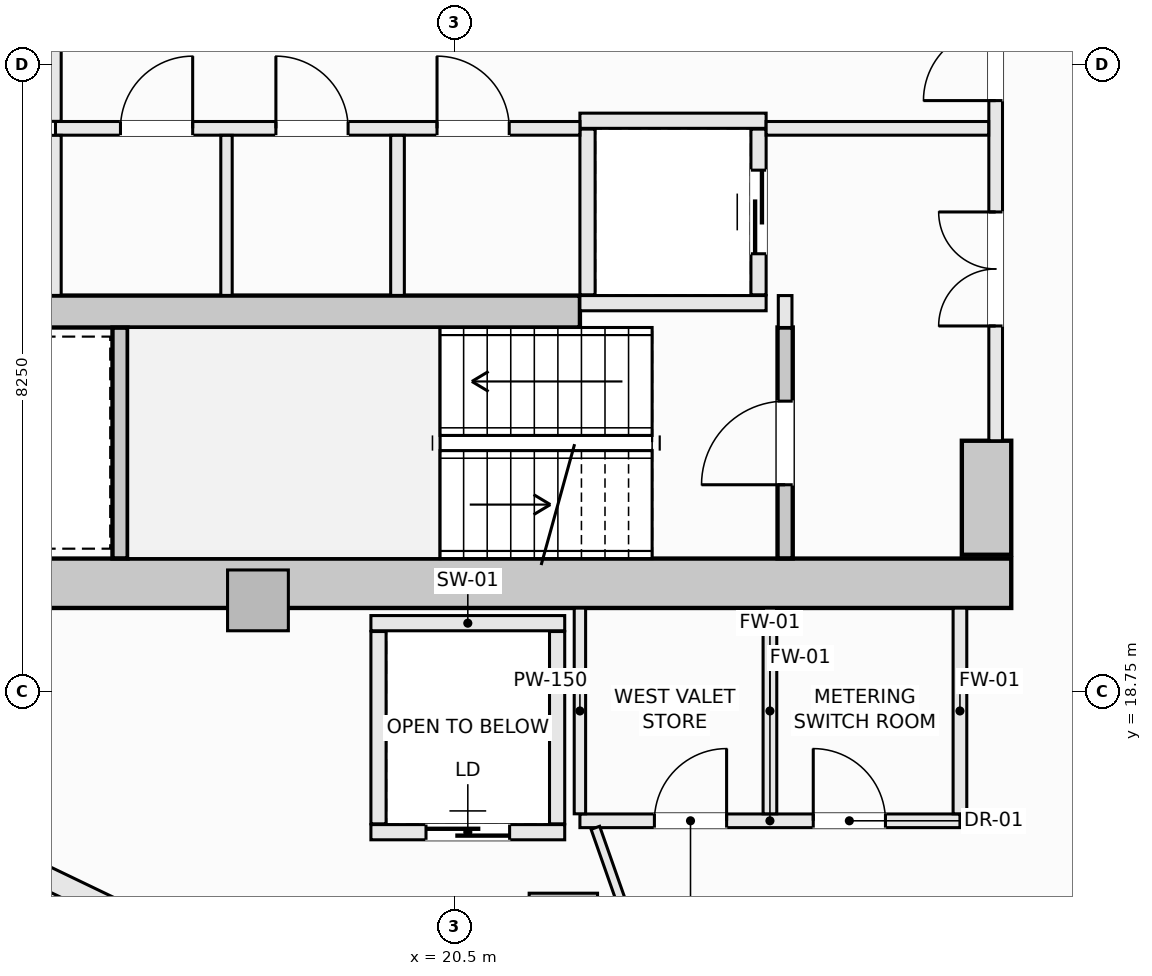
"""IFC4 building model, lengths in metres.
Left out: names, types, materials, properties, quantities, classifications, styles, units other than length and angle.
Written with IfcOpenShell. Run it as: python <this file> out.ifc"""

import sys

from ifc_helpers import new_model, si_unit, direction, frame, frame_2d, origin, origin_2d, place, context, subcontext, project, spatial, rectangle, extrude, element, fill, save


model = new_model("IFC4")
c1 = context("Model", 3, precision=1e-05, world=origin(), true_north=direction((0.0, 1.0)))
c2 = subcontext(c1, "Body", "Model", "MODEL_VIEW")
j1 = project(units=[si_unit("LENGTHUNIT", "METRE"), si_unit("PLANEANGLEUNIT", "RADIAN")], contexts=[c1])
p1 = place(None, origin())
s1 = spatial("IfcSite", under=j1, at=p1, CompositionType="ELEMENT")
p2 = place(p1, origin())
s2 = spatial("IfcBuilding", under=s1, at=p2, CompositionType="ELEMENT")
p3 = place(p2, frame((0.0, 0.0, 173.3)))
s3 = spatial("IfcBuildingStorey", under=s2, at=p3, CompositionType="ELEMENT", Elevation=173.3)
p4 = place(p3, frame((14.175, 20.175, -0.27), z_axis=(0.0, 0.0, 1.0), x_axis=(1.0, 0.0, 0.0)))
e1 = element("IfcWall", 1, at=p4, inside=s3, PredefinedType="SHEAR", context=c2, shape_type="SweptSolid", body=[
    extrude(rectangle(XDim=13.65, YDim=0.65, at=frame_2d((6.825, 0.0))), origin(), (0.0, 0.0, 1.0), 3.4),
])
p5 = place(p3, frame((27.5, 20.55, -0.27), z_axis=(0.0, 0.0, 1.0), x_axis=(0.0, 1.0, 0.0)))
e2 = element("IfcWall", 2, at=p5, inside=s3, PredefinedType="SHEAR", context=c2, shape_type="SweptSolid", body=[
    extrude(rectangle(XDim=1.5, YDim=0.65, at=frame_2d((0.75, 0.0))), origin(), (0.0, 0.0, 1.0), 3.4),
])
p6 = place(p3, frame((14.85, 23.75, -0.27), z_axis=(0.0, 0.0, 1.0), x_axis=(1.0, 0.0, 0.0)))
e3 = element("IfcWall", 3, at=p6, inside=s3, PredefinedType="SHEAR", context=c2, shape_type="SweptSolid", body=[
    extrude(rectangle(XDim=7.3, YDim=0.42, at=frame_2d((3.65, 0.0))), origin(), (0.0, 0.0, 1.0), 3.4),
])
p7 = place(p3, frame((21.932, 15.648, -0.27), z_axis=(0.0, 0.0, 1.0), x_axis=(1.0, 0.0, 0.0)))
e4 = element("IfcColumn", 4, at=p7, inside=s3, PredefinedType="COLUMN", context=c2, shape_type="SweptSolid", body=[
    extrude(rectangle(XDim=0.9, YDim=0.9, at=origin_2d()), origin(), (0.0, 0.0, 1.0), 3.4),
])
p8 = place(p3, frame((17.914, 19.95, -0.27), z_axis=(0.0, 0.0, 1.0), x_axis=(1.0, 0.0, 0.0)))
e5 = element("IfcColumn", 5, at=p8, inside=s3, PredefinedType="PILASTER", context=c2, shape_type="SweptSolid", body=[
    extrude(rectangle(XDim=0.8, YDim=0.8, at=origin_2d()), origin(), (0.0, 0.0, 1.0), 3.4),
])
p9 = place(p3, frame((11.127, 18.225, 0.0), z_axis=(0.0, 0.0, 1.0), x_axis=(0.901353070301, -0.433085029363, 0.0)))
e6 = element("IfcWall", 6, at=p9, inside=s3, PredefinedType="SOLIDWALL", context=c2, shape_type="SweptSolid", body=[
    extrude(rectangle(XDim=5.336, YDim=0.3, at=frame_2d((2.668, 0.0))), origin(), (0.0, 0.0, 1.0), 2.653),
])
p10 = place(p9, frame((1.618, 0.0, 0.74)))
e7 = element("IfcOpeningElement", 7, at=p10, cuts=e6, PredefinedType="OPENING", context=c2, shape_type="SweptSolid", body=[
    extrude(rectangle(XDim=2.1, YDim=1.7, at=frame_2d((1.05, 0.85))), frame((0.0, 0.16, 0.0), z_axis=(0.0, -1.0, 0.0), x_axis=(1.0, 0.0, 0.0)), (0.0, 0.0, 1.0), 0.32),
])
p11 = place(p3, frame((24.85, 20.502, -0.27), z_axis=(0.0, 0.0, 1.0), x_axis=(0.0, 1.0, 0.0)))
e8 = element("IfcWall", 8, at=p11, inside=s3, PredefinedType="SHEAR", context=c2, shape_type="SweptSolid", body=[
    extrude(rectangle(XDim=3.038, YDim=0.2, at=frame_2d((1.519, 0.0))), origin(), (0.0, 0.0, 1.0), 3.4),
])
p12 = place(p11, frame((0.969, 0.0, 0.27)))
e9 = element("IfcOpeningElement", 9, at=p12, cuts=e8, PredefinedType="OPENING", context=c2, shape_type="SweptSolid", body=[
    extrude(rectangle(XDim=1.1, YDim=2.15, at=frame_2d((0.55, 1.075))), frame((0.0, 0.11, 0.0), z_axis=(0.0, -1.0, 0.0), x_axis=(1.0, 0.0, 0.0)), (0.0, 0.0, 1.0), 0.22),
])
p13 = place(p3, frame((16.1, 20.502, -0.27), z_axis=(0.0, 0.0, 1.0), x_axis=(0.0, 1.0, 0.0)))
e10 = element("IfcWall", 10, at=p13, inside=s3, PredefinedType="SHEAR", context=c2, shape_type="SweptSolid", body=[
    extrude(rectangle(XDim=3.036, YDim=0.2, at=frame_2d((1.518, 0.0))), origin(), (0.0, 0.0, 1.0), 3.4),
])
for number, where, z_axis, x_axis in (
    (11, (22.15, 26.26, 0.0), (0.0, 0.0, 1.0), (1.0, 0.0, 0.0)),
    (12, (22.15, 23.86, 0.0), (0.0, 0.0, 1.0), (1.0, 0.0, 0.0)),
):
    element("IfcWall", number, at=place(p3, frame(where, z_axis=z_axis, x_axis=x_axis)), inside=s3, PredefinedType="SOLIDWALL", context=c2, shape_type="SweptSolid", body=[
        extrude(rectangle(XDim=2.45, YDim=0.2, at=frame_2d((1.225, 0.0))), origin(), (0.0, 0.0, 1.0), 3.13),
    ])
p14 = place(p3, frame((22.25, 23.97, 0.0), z_axis=(0.0, 0.0, 1.0), x_axis=(0.0, 1.0, 0.0)))
e13 = element("IfcWall", 13, at=p14, inside=s3, PredefinedType="SOLIDWALL", context=c2, shape_type="SweptSolid", body=[
    extrude(rectangle(XDim=2.18, YDim=0.2, at=frame_2d((1.09, 0.0))), origin(), (0.0, 0.0, 1.0), 3.13),
])
p15 = place(p3, frame((24.5, 23.97, 0.0), z_axis=(0.0, 0.0, 1.0), x_axis=(0.0, 1.0, 0.0)))
e14 = element("IfcWall", 14, at=p15, inside=s3, PredefinedType="SOLIDWALL", context=c2, shape_type="SweptSolid", body=[
    extrude(rectangle(XDim=2.18, YDim=0.2, at=frame_2d((1.09, 0.0))), origin(), (0.0, 0.0, 1.0), 3.13),
])
p16 = place(p15, frame((0.54, 0.0, 0.0)))
e15 = element("IfcOpeningElement", 15, at=p16, cuts=e14, PredefinedType="OPENING", context=c2, shape_type="SweptSolid", body=[
    extrude(rectangle(XDim=1.1, YDim=2.2, at=frame_2d((0.55, 1.1))), frame((0.0, 0.11, 0.0), z_axis=(0.0, -1.0, 0.0), x_axis=(1.0, 0.0, 0.0)), (0.0, 0.0, 1.0), 0.22),
])
p17 = place(p3, frame((19.4, 19.65, 0.0), z_axis=(0.0, 0.0, 1.0), x_axis=(1.0, 0.0, 0.0)))
e16 = element("IfcWall", 16, at=p17, inside=s3, PredefinedType="SOLIDWALL", context=c2, shape_type="SweptSolid", body=[
    extrude(rectangle(XDim=2.55, YDim=0.2, at=frame_2d((1.275, 0.0))), origin(), (0.0, 0.0, 1.0), 3.13),
])
p18 = place(p3, frame((19.4, 16.9, 0.0), z_axis=(0.0, 0.0, 1.0), x_axis=(1.0, 0.0, 0.0)))
e17 = element("IfcWall", 17, at=p18, inside=s3, PredefinedType="SOLIDWALL", context=c2, shape_type="SweptSolid", body=[
    extrude(rectangle(XDim=2.55, YDim=0.2, at=frame_2d((1.275, 0.0))), origin(), (0.0, 0.0, 1.0), 3.13),
])
p19 = place(p18, frame((0.725, 0.0, 0.0)))
e18 = element("IfcOpeningElement", 18, at=p19, cuts=e17, PredefinedType="OPENING", context=c2, shape_type="SweptSolid", body=[
    extrude(rectangle(XDim=1.1, YDim=2.2, at=frame_2d((0.55, 1.1))), frame((0.0, 0.11, 0.0), z_axis=(0.0, -1.0, 0.0), x_axis=(1.0, 0.0, 0.0)), (0.0, 0.0, 1.0), 0.22),
])
for number, where, z_axis, x_axis in (
    (19, (19.5, 17.01, 0.0), (0.0, 0.0, 1.0), (0.0, 1.0, 0.0)),
    (20, (21.85, 17.01, 0.0), (0.0, 0.0, 1.0), (0.0, 1.0, 0.0)),
):
    element("IfcWall", number, at=place(p3, frame(where, z_axis=z_axis, x_axis=x_axis)), inside=s3, PredefinedType="SOLIDWALL", context=c2, shape_type="SweptSolid", body=[
        extrude(rectangle(XDim=2.53, YDim=0.2, at=frame_2d((1.265, 0.0))), origin(), (0.0, 0.0, 1.0), 3.13),
    ])
p20 = place(p3, frame((24.85, 23.54, 0.0), z_axis=(0.0, 0.0, 1.0), x_axis=(0.0, 1.0, 0.0)))
e21 = element("IfcWall", 21, at=p20, inside=s3, PredefinedType="SOLIDWALL", context=c2, shape_type="SweptSolid", body=[
    extrude(rectangle(XDim=0.42, YDim=0.18, at=frame_2d((0.21, 0.0))), origin(), (0.0, 0.0, 1.0), 3.13),
])
p21 = place(p3, frame((27.62, 22.05, 0.0), z_axis=(0.0, 0.0, 1.0), x_axis=(0.0, 1.0, 0.0)))
e22 = element("IfcWall", 22, at=p21, inside=s3, PredefinedType="SOLIDWALL", context=c2, shape_type="SweptSolid", body=[
    extrude(rectangle(XDim=9.9, YDim=0.18, at=frame_2d((4.95, 0.0))), origin(), (0.0, 0.0, 1.0), 3.13),
])
p22 = place(p21, frame((4.475, 0.0, 0.0)))
e23 = element("IfcOpeningElement", 23, at=p22, cuts=e22, PredefinedType="OPENING", context=c2, shape_type="SweptSolid", body=[
    extrude(rectangle(XDim=0.95, YDim=2.1, at=frame_2d((0.475, 1.05))), frame((0.0, 0.1, 0.0), z_axis=(0.0, -1.0, 0.0), x_axis=(1.0, 0.0, 0.0)), (0.0, 0.0, 1.0), 0.2),
])
p23 = place(p21, frame((6.89, 0.0, 0.0)))
e24 = element("IfcOpeningElement", 24, at=p23, cuts=e22, PredefinedType="OPENING", context=c2, shape_type="SweptSolid", body=[
    extrude(rectangle(XDim=1.5, YDim=2.2, at=frame_2d((0.75, 1.1))), frame((0.0, 0.1, 0.0), z_axis=(0.0, -1.0, 0.0), x_axis=(1.0, 0.0, 0.0)), (0.0, 0.0, 1.0), 0.2),
])
p24 = place(p21, frame((1.51, 0.0, 0.0)))
e25 = element("IfcOpeningElement", 25, at=p24, cuts=e22, PredefinedType="OPENING", context=c2, shape_type="SweptSolid", body=[
    extrude(rectangle(XDim=1.5, YDim=2.2, at=frame_2d((0.75, 1.1))), frame((0.0, 0.1, 0.0), z_axis=(0.0, -1.0, 0.0), x_axis=(1.0, 0.0, 0.0)), (0.0, 0.0, 1.0), 0.2),
])
p25 = place(p3, frame((15.25, 26.16, 0.0), z_axis=(0.0, 0.0, 1.0), x_axis=(1.0, 0.0, 0.0)))
e26 = element("IfcWall", 26, at=p25, inside=s3, PredefinedType="SOLIDWALL", context=c2, shape_type="SweptSolid", body=[
    extrude(rectangle(XDim=6.9, YDim=0.18, at=frame_2d((3.45, 0.0))), origin(), (0.0, 0.0, 1.0), 3.13),
])
p26 = place(p25, frame((5.02, 0.0, 0.0)))
e27 = element("IfcOpeningElement", 27, at=p26, cuts=e26, PredefinedType="OPENING", context=c2, shape_type="SweptSolid", body=[
    extrude(rectangle(XDim=0.95, YDim=2.1, at=frame_2d((0.475, 1.05))), frame((0.0, 0.1, 0.0), z_axis=(0.0, -1.0, 0.0), x_axis=(1.0, 0.0, 0.0)), (0.0, 0.0, 1.0), 0.2),
])
p27 = place(p25, frame((0.855, 0.0, 0.0)))
e28 = element("IfcOpeningElement", 28, at=p27, cuts=e26, PredefinedType="OPENING", context=c2, shape_type="SweptSolid", body=[
    extrude(rectangle(XDim=0.95, YDim=2.1, at=frame_2d((0.475, 1.05))), frame((0.0, 0.1, 0.0), z_axis=(0.0, -1.0, 0.0), x_axis=(1.0, 0.0, 0.0)), (0.0, 0.0, 1.0), 0.2),
])
p28 = place(p25, frame((2.9, 0.0, 0.0)))
e29 = element("IfcOpeningElement", 29, at=p28, cuts=e26, PredefinedType="OPENING", context=c2, shape_type="SweptSolid", body=[
    extrude(rectangle(XDim=0.95, YDim=2.1, at=frame_2d((0.475, 1.05))), frame((0.0, 0.1, 0.0), z_axis=(0.0, -1.0, 0.0), x_axis=(1.0, 0.0, 0.0)), (0.0, 0.0, 1.0), 0.2),
])
p29 = place(p3, frame((24.6, 26.16, 0.0), z_axis=(0.0, 0.0, 1.0), x_axis=(1.0, 0.0, 0.0)))
e30 = element("IfcWall", 30, at=p29, inside=s3, PredefinedType="SOLIDWALL", context=c2, shape_type="SweptSolid", body=[
    extrude(rectangle(XDim=2.928, YDim=0.18, at=frame_2d((1.464, 0.0))), origin(), (0.0, 0.0, 1.0), 3.13),
])
p30 = place(p3, frame((15.25, 23.962, 0.0), z_axis=(0.0, 0.0, 1.0), x_axis=(0.0, 1.0, 0.0)))
e31 = element("IfcWall", 31, at=p30, inside=s3, PredefinedType="PARTITIONING", context=c2, shape_type="SweptSolid", body=[
    extrude(rectangle(XDim=2.106, YDim=0.15, at=frame_2d((1.053, 0.0))), origin(), (0.0, 0.0, 1.0), 3.13),
])
p31 = place(p3, frame((15.25, 26.252, 0.0), z_axis=(0.0, 0.0, 1.0), x_axis=(0.0, 1.0, 0.0)))
e32 = element("IfcWall", 32, at=p31, inside=s3, PredefinedType="PARTITIONING", context=c2, shape_type="SweptSolid", body=[
    extrude(rectangle(XDim=1.496, YDim=0.15, at=frame_2d((0.748, 0.0))), origin(), (0.0, 0.0, 1.0), 3.13),
])
p32 = place(p3, frame((19.75, 23.962, 0.0), z_axis=(0.0, 0.0, 1.0), x_axis=(0.0, 1.0, 0.0)))
e33 = element("IfcWall", 33, at=p32, inside=s3, PredefinedType="SOLIDWALL", context=c2, shape_type="SweptSolid", body=[
    extrude(rectangle(XDim=2.106, YDim=0.18, at=frame_2d((1.053, 0.0))), origin(), (0.0, 0.0, 1.0), 3.13),
])
p33 = place(p3, frame((17.5, 23.962, 0.0), z_axis=(0.0, 0.0, 1.0), x_axis=(0.0, 1.0, 0.0)))
e34 = element("IfcWall", 34, at=p33, inside=s3, PredefinedType="PARTITIONING", context=c2, shape_type="SweptSolid", body=[
    extrude(rectangle(XDim=2.106, YDim=0.15, at=frame_2d((1.053, 0.0))), origin(), (0.0, 0.0, 1.0), 3.13),
])
p34 = place(p3, frame((22.15, 17.05, 0.0), z_axis=(0.0, 0.0, 1.0), x_axis=(1.0, 0.0, 0.0)))
e35 = element("IfcWall", 35, at=p34, inside=s3, PredefinedType="SOLIDWALL", context=c2, shape_type="SweptSolid", body=[
    extrude(rectangle(XDim=5.0, YDim=0.18, at=frame_2d((2.5, 0.0))), origin(), (0.0, 0.0, 1.0), 3.13),
])
p35 = place(p34, frame((0.98, 0.0, 0.0)))
e36 = element("IfcOpeningElement", 36, at=p35, cuts=e35, PredefinedType="OPENING", context=c2, shape_type="SweptSolid", body=[
    extrude(rectangle(XDim=0.95, YDim=2.1, at=frame_2d((0.475, 1.05))), frame((0.0, 0.1, 0.0), z_axis=(0.0, -1.0, 0.0), x_axis=(1.0, 0.0, 0.0)), (0.0, 0.0, 1.0), 0.2),
])
p36 = place(p34, frame((3.07, 0.0, 0.0)))
e37 = element("IfcOpeningElement", 37, at=p36, cuts=e35, PredefinedType="OPENING", context=c2, shape_type="SweptSolid", body=[
    extrude(rectangle(XDim=0.95, YDim=2.1, at=frame_2d((0.475, 1.05))), frame((0.0, 0.1, 0.0), z_axis=(0.0, -1.0, 0.0), x_axis=(1.0, 0.0, 0.0)), (0.0, 0.0, 1.0), 0.2),
])
p37 = place(p3, frame((22.15, 17.142, 0.0), z_axis=(0.0, 0.0, 1.0), x_axis=(0.0, 1.0, 0.0)))
e38 = element("IfcWall", 38, at=p37, inside=s3, PredefinedType="PARTITIONING", context=c2, shape_type="SweptSolid", body=[
    extrude(rectangle(XDim=2.706, YDim=0.15, at=frame_2d((1.353, 0.0))), origin(), (0.0, 0.0, 1.0), 3.13),
])
for number, where, z_axis, x_axis in (
    (39, (24.65, 17.142, 0.0), (0.0, 0.0, 1.0), (0.0, 1.0, 0.0)),
    (40, (27.15, 17.142, 0.0), (0.0, 0.0, 1.0), (0.0, 1.0, 0.0)),
):
    element("IfcWall", number, at=place(p3, frame(where, z_axis=z_axis, x_axis=x_axis)), inside=s3, PredefinedType="SOLIDWALL", context=c2, shape_type="SweptSolid", body=[
        extrude(rectangle(XDim=2.706, YDim=0.18, at=frame_2d((1.353, 0.0))), origin(), (0.0, 0.0, 1.0), 3.13),
    ])
p38 = place(p3, frame((22.353, 16.958, 0.0), z_axis=(0.0, 0.0, 1.0), x_axis=(0.331370038458, -0.943500873138, 0.0)))
e41 = element("IfcWall", 41, at=p38, inside=s3, PredefinedType="PARTITIONING", context=c2, shape_type="SweptSolid", body=[
    extrude(rectangle(XDim=1.216, YDim=0.12, at=frame_2d((0.608, 0.0))), origin(), (0.0, 0.0, 1.0), 3.13),
])
p39 = place(p12, origin())
e42 = element("IfcDoor", 42, at=p39, inside=s3, OperationType="SINGLE_SWING_LEFT", PredefinedType="DOOR", context=c2, shape_type="SweptSolid", body=[
    extrude(rectangle(XDim=1.1, YDim=2.15, at=frame_2d((0.55, 1.075))), frame((0.0, 0.025, 0.0), z_axis=(0.0, -1.0, 0.0), x_axis=(1.0, 0.0, 0.0)), (0.0, 0.0, 1.0), 0.05),
])
fill(e9, e42)
p40 = place(p16, origin())
e43 = element("IfcDoor", 43, at=p40, inside=s3, OperationType="SLIDING_TO_LEFT", PredefinedType="DOOR", context=c2, shape_type="SweptSolid", body=[
    extrude(rectangle(XDim=1.1, YDim=2.2, at=frame_2d((0.55, 1.1))), frame((0.0, 0.025, 0.0), z_axis=(0.0, -1.0, 0.0), x_axis=(1.0, 0.0, 0.0)), (0.0, 0.0, 1.0), 0.05),
])
fill(e15, e43)
p41 = place(p19, origin())
e44 = element("IfcDoor", 44, at=p41, inside=s3, OperationType="SLIDING_TO_LEFT", PredefinedType="DOOR", context=c2, shape_type="SweptSolid", body=[
    extrude(rectangle(XDim=1.1, YDim=2.2, at=frame_2d((0.55, 1.1))), frame((0.0, 0.025, 0.0), z_axis=(0.0, -1.0, 0.0), x_axis=(1.0, 0.0, 0.0)), (0.0, 0.0, 1.0), 0.05),
])
fill(e18, e44)
p42 = place(p22, origin())
e45 = element("IfcDoor", 45, at=p42, inside=s3, OperationType="SINGLE_SWING_LEFT", PredefinedType="DOOR", context=c2, shape_type="SweptSolid", body=[
    extrude(rectangle(XDim=0.95, YDim=2.1, at=frame_2d((0.475, 1.05))), frame((0.0, 0.025, 0.0), z_axis=(0.0, -1.0, 0.0), x_axis=(1.0, 0.0, 0.0)), (0.0, 0.0, 1.0), 0.05),
])
fill(e23, e45)
p43 = place(p24, origin())
e46 = element("IfcDoor", 46, at=p43, inside=s3, OperationType="DOUBLE_DOOR_SINGLE_SWING", PredefinedType="DOOR", context=c2, shape_type="SweptSolid", body=[
    extrude(rectangle(XDim=1.5, YDim=2.2, at=frame_2d((0.75, 1.1))), frame((0.0, 0.025, 0.0), z_axis=(0.0, -1.0, 0.0), x_axis=(1.0, 0.0, 0.0)), (0.0, 0.0, 1.0), 0.05),
])
fill(e25, e46)
p44 = place(p26, origin())
e47 = element("IfcDoor", 47, at=p44, inside=s3, OperationType="SINGLE_SWING_LEFT", PredefinedType="DOOR", context=c2, shape_type="SweptSolid", body=[
    extrude(rectangle(XDim=0.95, YDim=2.1, at=frame_2d((0.475, 1.05))), frame((0.0, 0.025, 0.0), z_axis=(0.0, -1.0, 0.0), x_axis=(1.0, 0.0, 0.0)), (0.0, 0.0, 1.0), 0.05),
])
fill(e27, e47)
p45 = place(p27, origin())
e48 = element("IfcDoor", 48, at=p45, inside=s3, OperationType="SINGLE_SWING_RIGHT", PredefinedType="DOOR", context=c2, shape_type="SweptSolid", body=[
    extrude(rectangle(XDim=0.95, YDim=2.1, at=frame_2d((0.475, 1.05))), frame((0.0, 0.025, 0.0), z_axis=(0.0, -1.0, 0.0), x_axis=(1.0, 0.0, 0.0)), (0.0, 0.0, 1.0), 0.05),
])
fill(e28, e48)
p46 = place(p28, origin())
e49 = element("IfcDoor", 49, at=p46, inside=s3, OperationType="SINGLE_SWING_LEFT", PredefinedType="DOOR", context=c2, shape_type="SweptSolid", body=[
    extrude(rectangle(XDim=0.95, YDim=2.1, at=frame_2d((0.475, 1.05))), frame((0.0, 0.025, 0.0), z_axis=(0.0, -1.0, 0.0), x_axis=(1.0, 0.0, 0.0)), (0.0, 0.0, 1.0), 0.05),
])
fill(e29, e49)
p47 = place(p35, origin())
e50 = element("IfcDoor", 50, at=p47, inside=s3, OperationType="SINGLE_SWING_RIGHT", PredefinedType="DOOR", context=c2, shape_type="SweptSolid", body=[
    extrude(rectangle(XDim=0.95, YDim=2.1, at=frame_2d((0.475, 1.05))), frame((0.0, 0.025, 0.0), z_axis=(0.0, -1.0, 0.0), x_axis=(1.0, 0.0, 0.0)), (0.0, 0.0, 1.0), 0.05),
])
fill(e36, e50)
p48 = place(p36, origin())
e51 = element("IfcDoor", 51, at=p48, inside=s3, OperationType="SINGLE_SWING_LEFT", PredefinedType="DOOR", context=c2, shape_type="SweptSolid", body=[
    extrude(rectangle(XDim=0.95, YDim=2.1, at=frame_2d((0.475, 1.05))), frame((0.0, 0.025, 0.0), z_axis=(0.0, -1.0, 0.0), x_axis=(1.0, 0.0, 0.0)), (0.0, 0.0, 1.0), 0.05),
])
fill(e37, e51)
save(model, sys.argv[1])
